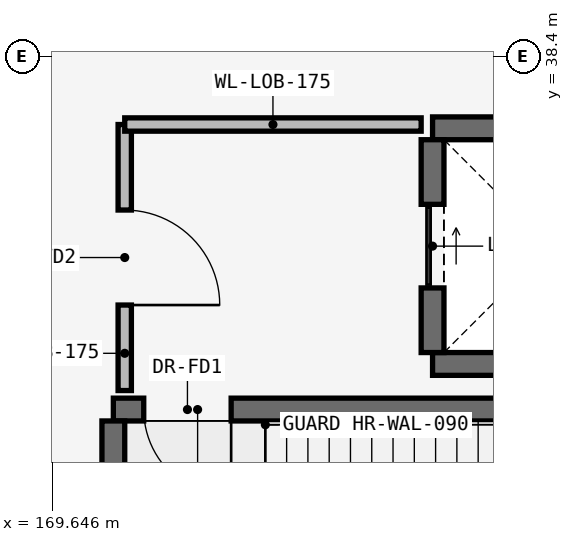
"""IFC4 building model, lengths in metres.
Left out: names, types, materials, properties, quantities, classifications, styles, units other than length and angle.
Written with IfcOpenShell. Run it as: python <this file> out.ifc"""

import sys

from ifc_helpers import new_model, si_unit, direction, frame, frame_2d, origin, place, context, subcontext, project, spatial, rectangle, extrude, element, fill, save


model = new_model("IFC4")
c1 = context("Model", 3, precision=1e-05, world=origin(), true_north=direction((0.0, 1.0)))
c2 = subcontext(c1, "Body", "Model", "MODEL_VIEW")
j1 = project(units=[si_unit("LENGTHUNIT", "METRE"), si_unit("PLANEANGLEUNIT", "RADIAN")], contexts=[c1])
p1 = place(None, origin())
s1 = spatial("IfcSite", under=j1, at=p1, CompositionType="ELEMENT")
p2 = place(p1, origin())
s2 = spatial("IfcBuilding", under=s1, at=p2, CompositionType="ELEMENT")
p3 = place(p2, frame((0.0, 0.0, 14.4)))
s3 = spatial("IfcBuildingStorey", under=s2, at=p3, CompositionType="ELEMENT", Elevation=14.4)
p4 = place(p3, frame((170.45, 33.75, 0.0), z_axis=(0.0, 0.0, 1.0), x_axis=(1.0, 0.0, 0.0)))
e1 = element("IfcWall", 1, at=p4, inside=s3, PredefinedType="SHEAR", context=c2, shape_type="SweptSolid", body=[
    extrude(rectangle(XDim=7.92, YDim=0.3, at=frame_2d((3.96, 0.0))), origin(), (0.0, 0.0, 1.0), 3.95),
])
p5 = place(p4, frame((0.4, 0.0, 0.0)))
e2 = element("IfcOpeningElement", 2, at=p5, cuts=e1, PredefinedType="OPENING", context=c2, shape_type="SweptSolid", body=[
    extrude(rectangle(XDim=1.15, YDim=2.15, at=frame_2d((0.575, 1.075))), frame((0.0, 0.165, 0.0), z_axis=(0.0, -1.0, 0.0), x_axis=(1.0, 0.0, 0.0)), (0.0, 0.0, 1.0), 0.33),
])
p6 = place(p3, frame((170.45, 29.7, 0.0), z_axis=(0.0, 0.0, 1.0), x_axis=(0.0, 1.0, 0.0)))
e3 = element("IfcWall", 3, at=p6, inside=s3, PredefinedType="SHEAR", context=c2, shape_type="SweptSolid", body=[
    extrude(rectangle(XDim=3.9, YDim=0.3, at=frame_2d((1.95, 0.0))), origin(), (0.0, 0.0, 1.0), 3.95),
])
for number, where, z_axis, x_axis in (
    (4, (174.65, 34.35, 0.0), (0.0, 0.0, 1.0), (1.0, 0.0, 0.0)),
    (5, (174.65, 37.45, 0.0), (0.0, 0.0, 1.0), (1.0, 0.0, 0.0)),
):
    element("IfcWall", number, at=place(p3, frame(where, z_axis=z_axis, x_axis=x_axis)), inside=s3, PredefinedType="SHEAR", context=c2, shape_type="SweptSolid", body=[
        extrude(rectangle(XDim=3.1, YDim=0.3, at=frame_2d((1.55, 0.0))), origin(), (0.0, 0.0, 1.0), 3.95),
    ])
p7 = place(p3, frame((174.65, 34.5, 0.0), z_axis=(0.0, 0.0, 1.0), x_axis=(0.0, 1.0, 0.0)))
e6 = element("IfcWall", 6, at=p7, inside=s3, PredefinedType="SHEAR", context=c2, shape_type="SweptSolid", body=[
    extrude(rectangle(XDim=2.8, YDim=0.3, at=frame_2d((1.4, 0.0))), origin(), (0.0, 0.0, 1.0), 3.95),
])
p8 = place(p7, frame((0.85, 0.0, 0.0)))
e7 = element("IfcOpeningElement", 7, at=p8, cuts=e6, PredefinedType="OPENING", context=c2, shape_type="SweptSolid", body=[
    extrude(rectangle(XDim=1.1, YDim=2.15, at=frame_2d((0.55, 1.075))), frame((0.0, 0.165, 0.0), z_axis=(0.0, -1.0, 0.0), x_axis=(1.0, 0.0, 0.0)), (0.0, 0.0, 1.0), 0.33),
])
p9 = place(p3, frame((170.6, 34.0, 0.0), z_axis=(0.0, 0.0, 1.0), x_axis=(0.0, 1.0, 0.0)))
e8 = element("IfcWall", 8, at=p9, inside=s3, PredefinedType="PARTITIONING", context=c2, shape_type="SweptSolid", body=[
    extrude(rectangle(XDim=3.5, YDim=0.175, at=frame_2d((1.75, 0.0))), origin(), (0.0, 0.0, 1.0), 3.95),
])
p10 = place(p9, frame((1.125, 0.0, 0.0)))
e9 = element("IfcOpeningElement", 9, at=p10, cuts=e8, PredefinedType="OPENING", context=c2, shape_type="SweptSolid", body=[
    extrude(rectangle(XDim=1.25, YDim=2.2, at=frame_2d((0.625, 1.1))), frame((0.0, 0.103, 0.0), z_axis=(0.0, -1.0, 0.0), x_axis=(1.0, 0.0, 0.0)), (0.0, 0.0, 1.0), 0.205),
])
p11 = place(p3, frame((170.6, 37.5, 0.0), z_axis=(0.0, 0.0, 1.0), x_axis=(1.0, 0.0, 0.0)))
e10 = element("IfcWall", 10, at=p11, inside=s3, PredefinedType="PARTITIONING", context=c2, shape_type="SweptSolid", body=[
    extrude(rectangle(XDim=3.9, YDim=0.175, at=frame_2d((1.95, 0.0))), origin(), (0.0, 0.0, 1.0), 3.95),
])
p12 = place(p5, frame((1.15, 0.0, 0.0), z_axis=(0.0, 0.0, 1.0), x_axis=(-1.0, 0.0, 0.0)))
e11 = element("IfcDoor", 11, at=p12, inside=s3, OperationType="SINGLE_SWING_RIGHT", PredefinedType="DOOR", context=c2, shape_type="SweptSolid", body=[
    extrude(rectangle(XDim=1.15, YDim=2.15, at=frame_2d((0.575, 1.075))), frame((0.0, 0.025, 0.0), z_axis=(0.0, -1.0, 0.0), x_axis=(1.0, 0.0, 0.0)), (0.0, 0.0, 1.0), 0.05),
])
fill(e2, e11)
p13 = place(p8, origin())
e12 = element("IfcDoor", 12, at=p13, inside=s3, OperationType="SLIDING_TO_LEFT", PredefinedType="DOOR", context=c2, shape_type="SweptSolid", body=[
    extrude(rectangle(XDim=1.1, YDim=2.15, at=frame_2d((0.55, 1.075))), frame((0.0, 0.025, 0.0), z_axis=(0.0, -1.0, 0.0), x_axis=(1.0, 0.0, 0.0)), (0.0, 0.0, 1.0), 0.05),
])
fill(e7, e12)
p14 = place(p10, frame((1.25, 0.0, 0.0), z_axis=(0.0, 0.0, 1.0), x_axis=(-1.0, 0.0, 0.0)))
e13 = element("IfcDoor", 13, at=p14, inside=s3, OperationType="SINGLE_SWING_LEFT", PredefinedType="DOOR", context=c2, shape_type="SweptSolid", body=[
    extrude(rectangle(XDim=1.25, YDim=2.2, at=frame_2d((0.625, 1.1))), frame((0.0, 0.025, 0.0), z_axis=(0.0, -1.0, 0.0), x_axis=(1.0, 0.0, 0.0)), (0.0, 0.0, 1.0), 0.05),
])
fill(e9, e13)
save(model, sys.argv[1])
